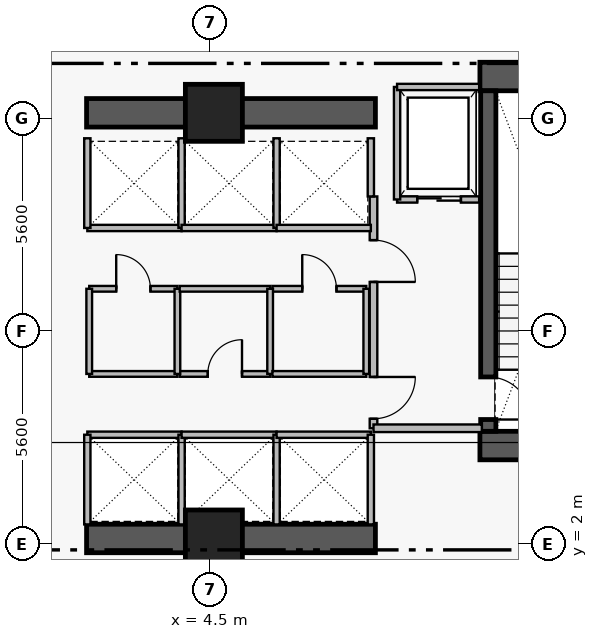
"""IFC4 building model, lengths in metres.
Left out: names, types, materials, properties, quantities, classifications, styles, units other than length and angle.
Written with IfcOpenShell. Run it as: python <this file> out.ifc"""

import sys

from ifc_helpers import new_model, si_unit, direction, frame, frame_2d, origin, origin_2d, place, context, subcontext, project, spatial, rectangle, extrude, element, fill, save


model = new_model("IFC4")
c1 = context("Model", 3, precision=1e-05, world=origin(), true_north=direction((0.0, 1.0)))
c2 = subcontext(c1, "Body", "Model", "MODEL_VIEW")
j1 = project(units=[si_unit("LENGTHUNIT", "METRE"), si_unit("PLANEANGLEUNIT", "RADIAN")], contexts=[c1])
p1 = place(None, origin())
s1 = spatial("IfcSite", under=j1, at=p1, CompositionType="ELEMENT")
p2 = place(p1, origin())
s2 = spatial("IfcBuilding", under=s1, at=p2, CompositionType="ELEMENT")
p3 = place(p2, frame((0.0, 0.0, 99.3)))
s3 = spatial("IfcBuildingStorey", under=s2, at=p3, CompositionType="ELEMENT", Elevation=99.3)
for number, where, z_axis, x_axis in (
    (1, (11.6, 14.305, 0.0), (0.0, 0.0, 1.0), (1.0, 0.0, 0.0)),
    (2, (11.6, 4.595, 0.0), (0.0, 0.0, 1.0), (1.0, 0.0, 0.0)),
):
    element("IfcWall", number, at=place(p3, frame(where, z_axis=z_axis, x_axis=x_axis)), inside=s3, PredefinedType="SHEAR", context=c2, shape_type="SweptSolid", body=[
        extrude(rectangle(XDim=4.56, YDim=0.75, at=frame_2d((2.28, 0.0))), origin(), (0.0, 0.0, 1.0), 3.46),
    ])
for number, where, z_axis, x_axis in (
    (3, (1.25, 2.15, 0.0), (0.0, 0.0, 1.0), (1.0, 0.0, 0.0)),
    (4, (1.25, 13.35, 0.0), (0.0, 0.0, 1.0), (1.0, 0.0, 0.0)),
):
    element("IfcWall", number, at=place(p3, frame(where, z_axis=z_axis, x_axis=x_axis)), inside=s3, PredefinedType="SHEAR", context=c2, shape_type="SweptSolid", body=[
        extrude(rectangle(XDim=7.6, YDim=0.75, at=frame_2d((3.8, 0.0))), origin(), (0.0, 0.0, 1.0), 3.43),
    ])
p4 = place(p3, frame((11.82, 13.93, 0.0), z_axis=(0.0, 0.0, 1.0), x_axis=(0.0, -1.0, 0.0)))
e5 = element("IfcWall", 5, at=p4, inside=s3, PredefinedType="SHEAR", context=c2, shape_type="SweptSolid", body=[
    extrude(rectangle(XDim=8.96, YDim=0.4, at=frame_2d((4.48, 0.0))), origin(), (0.0, 0.0, 1.0), 3.46),
])
p5 = place(p4, frame((7.53, 0.0, 0.0)))
e6 = element("IfcOpeningElement", 6, at=p5, cuts=e5, PredefinedType="OPENING", context=c2, shape_type="SweptSolid", body=[
    extrude(rectangle(XDim=1.12, YDim=2.22, at=frame_2d((0.56, 1.11))), frame((0.0, 0.21, 0.0), z_axis=(0.0, -1.0, 0.0), x_axis=(1.0, 0.0, 0.0)), (0.0, 0.0, 1.0), 0.42),
])
for number, where, z_axis, x_axis in (
    (7, (4.6, 13.35, 0.0), (0.0, 0.0, 1.0), (1.0, 0.0, 0.0)),
    (8, (4.6, 2.15, 0.0), (0.0, 0.0, 1.0), (1.0, 0.0, 0.0)),
):
    element("IfcColumn", number, at=place(p3, frame(where, z_axis=z_axis, x_axis=x_axis)), inside=s3, PredefinedType="COLUMN", context=c2, shape_type="SweptSolid", body=[
        extrude(rectangle(XDim=1.5, YDim=1.5, at=origin_2d()), origin(), (0.0, 0.0, 1.0), 3.65),
    ])
p6 = place(p3, frame((8.8, 11.15, 0.0), z_axis=(0.0, 0.0, 1.0), x_axis=(0.0, -1.0, 0.0)))
e9 = element("IfcWall", 9, at=p6, inside=s3, PredefinedType="PARTITIONING", context=c2, shape_type="SweptSolid", body=[
    extrude(rectangle(XDim=6.1, YDim=0.2, at=frame_2d((3.05, 0.0))), origin(), (0.0, 0.0, 1.0), 3.43),
])
p7 = place(p6, frame((1.15, 0.0, 0.0)))
e10 = element("IfcOpeningElement", 10, at=p7, cuts=e9, PredefinedType="OPENING", context=c2, shape_type="SweptSolid", body=[
    extrude(rectangle(XDim=1.1, YDim=2.2, at=frame_2d((0.55, 1.1))), frame((0.0, 0.11, 0.0), z_axis=(0.0, -1.0, 0.0), x_axis=(1.0, 0.0, 0.0)), (0.0, 0.0, 1.0), 0.22),
])
p8 = place(p6, frame((4.75, 0.0, 0.0)))
e11 = element("IfcOpeningElement", 11, at=p8, cuts=e9, PredefinedType="OPENING", context=c2, shape_type="SweptSolid", body=[
    extrude(rectangle(XDim=1.1, YDim=2.2, at=frame_2d((0.55, 1.1))), frame((0.0, 0.11, 0.0), z_axis=(0.0, -1.0, 0.0), x_axis=(1.0, 0.0, 0.0)), (0.0, 0.0, 1.0), 0.22),
])
p9 = place(p3, frame((9.42, 11.07, 0.0), z_axis=(0.0, 0.0, 1.0), x_axis=(1.0, 0.0, 0.0)))
e12 = element("IfcWall", 12, at=p9, inside=s3, PredefinedType="PARTITIONING", context=c2, shape_type="SweptSolid", body=[
    extrude(rectangle(XDim=2.16, YDim=0.165, at=frame_2d((1.08, 0.0))), origin(), (0.0, 0.0, 1.0), 3.43),
])
p10 = place(p9, frame((0.53, 0.0, 0.0)))
e13 = element("IfcOpeningElement", 13, at=p10, cuts=e12, PredefinedType="OPENING", context=c2, shape_type="SweptSolid", body=[
    extrude(rectangle(XDim=1.15, YDim=2.25, at=frame_2d((0.575, 1.125))), frame((0.0, 0.093, 0.0), z_axis=(0.0, -1.0, 0.0), x_axis=(1.0, 0.0, 0.0)), (0.0, 0.0, 1.0), 0.185),
])
p11 = place(p3, frame((1.32, 8.72, 0.0), z_axis=(0.0, 0.0, 1.0), x_axis=(1.0, 0.0, 0.0)))
e14 = element("IfcWall", 14, at=p11, inside=s3, PredefinedType="PARTITIONING", context=c2, shape_type="SweptSolid", body=[
    extrude(rectangle(XDim=2.32, YDim=0.15, at=frame_2d((1.16, 0.0))), origin(), (0.0, 0.0, 1.0), 3.43),
])
p12 = place(p11, frame((0.71, 0.0, 0.0)))
e15 = element("IfcOpeningElement", 15, at=p12, cuts=e14, PredefinedType="OPENING", context=c2, shape_type="SweptSolid", body=[
    extrude(rectangle(XDim=0.9, YDim=2.15, at=frame_2d((0.45, 1.075))), frame((0.0, 0.085, 0.0), z_axis=(0.0, -1.0, 0.0), x_axis=(1.0, 0.0, 0.0)), (0.0, 0.0, 1.0), 0.17),
])
p13 = place(p3, frame((3.7, 6.48, 0.0), z_axis=(0.0, 0.0, 1.0), x_axis=(1.0, 0.0, 0.0)))
e16 = element("IfcWall", 16, at=p13, inside=s3, PredefinedType="PARTITIONING", context=c2, shape_type="SweptSolid", body=[
    extrude(rectangle(XDim=2.38, YDim=0.15, at=frame_2d((1.19, 0.0))), origin(), (0.0, 0.0, 1.0), 3.43),
])
p14 = place(p13, frame((0.74, 0.0, 0.0)))
e17 = element("IfcOpeningElement", 17, at=p14, cuts=e16, PredefinedType="OPENING", context=c2, shape_type="SweptSolid", body=[
    extrude(rectangle(XDim=0.9, YDim=2.15, at=frame_2d((0.45, 1.075))), frame((0.0, 0.085, 0.0), z_axis=(0.0, -1.0, 0.0), x_axis=(1.0, 0.0, 0.0)), (0.0, 0.0, 1.0), 0.17),
])
p15 = place(p3, frame((6.14, 8.72, 0.0), z_axis=(0.0, 0.0, 1.0), x_axis=(1.0, 0.0, 0.0)))
e18 = element("IfcWall", 18, at=p15, inside=s3, PredefinedType="PARTITIONING", context=c2, shape_type="SweptSolid", body=[
    extrude(rectangle(XDim=2.47, YDim=0.15, at=frame_2d((1.235, 0.0))), origin(), (0.0, 0.0, 1.0), 3.43),
])
p16 = place(p15, frame((0.785, 0.0, 0.0)))
e19 = element("IfcOpeningElement", 19, at=p16, cuts=e18, PredefinedType="OPENING", context=c2, shape_type="SweptSolid", body=[
    extrude(rectangle(XDim=0.9, YDim=2.15, at=frame_2d((0.45, 1.075))), frame((0.0, 0.085, 0.0), z_axis=(0.0, -1.0, 0.0), x_axis=(1.0, 0.0, 0.0)), (0.0, 0.0, 1.0), 0.17),
])
p17 = place(p3, frame((8.8, 5.05, 0.0), z_axis=(0.0, 0.0, 1.0), x_axis=(1.0, 0.0, 0.0)))
e20 = element("IfcWall", 20, at=p17, inside=s3, PredefinedType="PARTITIONING", context=c2, shape_type="SweptSolid", body=[
    extrude(rectangle(XDim=2.85, YDim=0.2, at=frame_2d((1.425, 0.0))), origin(), (0.0, 0.0, 1.0), 3.43),
])
p18 = place(p3, frame((9.42, 11.07, 0.0), z_axis=(0.0, 0.0, 1.0), x_axis=(0.0, 1.0, 0.0)))
e21 = element("IfcWall", 21, at=p18, inside=s3, PredefinedType="PARTITIONING", context=c2, shape_type="SweptSolid", body=[
    extrude(rectangle(XDim=2.96, YDim=0.165, at=frame_2d((1.48, 0.0))), origin(), (0.0, 0.0, 1.0), 3.43),
])
p19 = place(p3, frame((9.42, 14.03, 0.0), z_axis=(0.0, 0.0, 1.0), x_axis=(1.0, 0.0, 0.0)))
e22 = element("IfcWall", 22, at=p19, inside=s3, PredefinedType="PARTITIONING", context=c2, shape_type="SweptSolid", body=[
    extrude(rectangle(XDim=2.16, YDim=0.165, at=frame_2d((1.08, 0.0))), origin(), (0.0, 0.0, 1.0), 3.43),
])
p20 = place(p3, frame((1.27, 4.88, 0.0), z_axis=(0.0, 0.0, 1.0), x_axis=(1.0, 0.0, 0.0)))
e23 = element("IfcWall", 23, at=p20, inside=s3, PredefinedType="PARTITIONING", context=c2, shape_type="SweptSolid", body=[
    extrude(rectangle(XDim=2.48, YDim=0.165, at=frame_2d((1.24, 0.0))), origin(), (0.0, 0.0, 1.0), 3.43),
])
for number, where, z_axis, x_axis in (
    (24, (1.27, 2.52, 0.0), (0.0, 0.0, 1.0), (0.0, 1.0, 0.0)),
    (25, (3.75, 2.52, 0.0), (0.0, 0.0, 1.0), (0.0, 1.0, 0.0)),
):
    element("IfcWall", number, at=place(p3, frame(where, z_axis=z_axis, x_axis=x_axis)), inside=s3, PredefinedType="PARTITIONING", context=c2, shape_type="SweptSolid", body=[
        extrude(rectangle(XDim=2.36, YDim=0.165, at=frame_2d((1.18, 0.0))), origin(), (0.0, 0.0, 1.0), 3.43),
    ])
p21 = place(p3, frame((1.27, 10.32, 0.0), z_axis=(0.0, 0.0, 1.0), x_axis=(1.0, 0.0, 0.0)))
e26 = element("IfcWall", 26, at=p21, inside=s3, PredefinedType="PARTITIONING", context=c2, shape_type="SweptSolid", body=[
    extrude(rectangle(XDim=2.48, YDim=0.165, at=frame_2d((1.24, 0.0))), origin(), (0.0, 0.0, 1.0), 3.43),
])
for number, where, z_axis, x_axis in (
    (27, (1.27, 10.32, 0.0), (0.0, 0.0, 1.0), (0.0, 1.0, 0.0)),
    (28, (3.75, 10.32, 0.0), (0.0, 0.0, 1.0), (0.0, 1.0, 0.0)),
):
    element("IfcWall", number, at=place(p3, frame(where, z_axis=z_axis, x_axis=x_axis)), inside=s3, PredefinedType="PARTITIONING", context=c2, shape_type="SweptSolid", body=[
        extrude(rectangle(XDim=2.36, YDim=0.165, at=frame_2d((1.18, 0.0))), origin(), (0.0, 0.0, 1.0), 3.43),
    ])
p22 = place(p3, frame((3.75, 4.88, 0.0), z_axis=(0.0, 0.0, 1.0), x_axis=(1.0, 0.0, 0.0)))
e29 = element("IfcWall", 29, at=p22, inside=s3, PredefinedType="PARTITIONING", context=c2, shape_type="SweptSolid", body=[
    extrude(rectangle(XDim=2.5, YDim=0.165, at=frame_2d((1.25, 0.0))), origin(), (0.0, 0.0, 1.0), 3.43),
])
p23 = place(p3, frame((6.25, 2.52, 0.0), z_axis=(0.0, 0.0, 1.0), x_axis=(0.0, 1.0, 0.0)))
e30 = element("IfcWall", 30, at=p23, inside=s3, PredefinedType="PARTITIONING", context=c2, shape_type="SweptSolid", body=[
    extrude(rectangle(XDim=2.36, YDim=0.165, at=frame_2d((1.18, 0.0))), origin(), (0.0, 0.0, 1.0), 3.43),
])
p24 = place(p3, frame((6.25, 4.88, 0.0), z_axis=(0.0, 0.0, 1.0), x_axis=(1.0, 0.0, 0.0)))
e31 = element("IfcWall", 31, at=p24, inside=s3, PredefinedType="PARTITIONING", context=c2, shape_type="SweptSolid", body=[
    extrude(rectangle(XDim=2.48, YDim=0.165, at=frame_2d((1.24, 0.0))), origin(), (0.0, 0.0, 1.0), 3.43),
])
p25 = place(p3, frame((8.73, 2.52, 0.0), z_axis=(0.0, 0.0, 1.0), x_axis=(0.0, 1.0, 0.0)))
e32 = element("IfcWall", 32, at=p25, inside=s3, PredefinedType="PARTITIONING", context=c2, shape_type="SweptSolid", body=[
    extrude(rectangle(XDim=2.36, YDim=0.165, at=frame_2d((1.18, 0.0))), origin(), (0.0, 0.0, 1.0), 3.43),
])
p26 = place(p3, frame((3.75, 10.32, 0.0), z_axis=(0.0, 0.0, 1.0), x_axis=(1.0, 0.0, 0.0)))
e33 = element("IfcWall", 33, at=p26, inside=s3, PredefinedType="PARTITIONING", context=c2, shape_type="SweptSolid", body=[
    extrude(rectangle(XDim=2.5, YDim=0.165, at=frame_2d((1.25, 0.0))), origin(), (0.0, 0.0, 1.0), 3.43),
])
p27 = place(p3, frame((6.25, 10.32, 0.0), z_axis=(0.0, 0.0, 1.0), x_axis=(0.0, 1.0, 0.0)))
e34 = element("IfcWall", 34, at=p27, inside=s3, PredefinedType="PARTITIONING", context=c2, shape_type="SweptSolid", body=[
    extrude(rectangle(XDim=2.36, YDim=0.165, at=frame_2d((1.18, 0.0))), origin(), (0.0, 0.0, 1.0), 3.43),
])
p28 = place(p3, frame((6.25, 10.32, 0.0), z_axis=(0.0, 0.0, 1.0), x_axis=(1.0, 0.0, 0.0)))
e35 = element("IfcWall", 35, at=p28, inside=s3, PredefinedType="PARTITIONING", context=c2, shape_type="SweptSolid", body=[
    extrude(rectangle(XDim=2.48, YDim=0.165, at=frame_2d((1.24, 0.0))), origin(), (0.0, 0.0, 1.0), 3.43),
])
p29 = place(p3, frame((8.73, 11.15, 0.0), z_axis=(0.0, 0.0, 1.0), x_axis=(0.0, 1.0, 0.0)))
e36 = element("IfcWall", 36, at=p29, inside=s3, PredefinedType="PARTITIONING", context=c2, shape_type="SweptSolid", body=[
    extrude(rectangle(XDim=1.53, YDim=0.165, at=frame_2d((0.765, 0.0))), origin(), (0.0, 0.0, 1.0), 3.43),
])
p30 = place(p3, frame((1.32, 6.48, 0.0), z_axis=(0.0, 0.0, 1.0), x_axis=(1.0, 0.0, 0.0)))
e37 = element("IfcWall", 37, at=p30, inside=s3, PredefinedType="PARTITIONING", context=c2, shape_type="SweptSolid", body=[
    extrude(rectangle(XDim=2.32, YDim=0.15, at=frame_2d((1.16, 0.0))), origin(), (0.0, 0.0, 1.0), 3.43),
])
for number, where, z_axis, x_axis in (
    (38, (1.32, 6.48, 0.0), (0.0, 0.0, 1.0), (0.0, 1.0, 0.0)),
    (39, (3.64, 6.48, 0.0), (0.0, 0.0, 1.0), (0.0, 1.0, 0.0)),
):
    element("IfcWall", number, at=place(p3, frame(where, z_axis=z_axis, x_axis=x_axis)), inside=s3, PredefinedType="PARTITIONING", context=c2, shape_type="SweptSolid", body=[
        extrude(rectangle(XDim=2.24, YDim=0.15, at=frame_2d((1.12, 0.0))), origin(), (0.0, 0.0, 1.0), 3.43),
    ])
p31 = place(p3, frame((3.7, 8.72, 0.0), z_axis=(0.0, 0.0, 1.0), x_axis=(1.0, 0.0, 0.0)))
e40 = element("IfcWall", 40, at=p31, inside=s3, PredefinedType="PARTITIONING", context=c2, shape_type="SweptSolid", body=[
    extrude(rectangle(XDim=2.38, YDim=0.15, at=frame_2d((1.19, 0.0))), origin(), (0.0, 0.0, 1.0), 3.43),
])
p32 = place(p3, frame((6.08, 6.48, 0.0), z_axis=(0.0, 0.0, 1.0), x_axis=(0.0, 1.0, 0.0)))
e41 = element("IfcWall", 41, at=p32, inside=s3, PredefinedType="PARTITIONING", context=c2, shape_type="SweptSolid", body=[
    extrude(rectangle(XDim=2.24, YDim=0.15, at=frame_2d((1.12, 0.0))), origin(), (0.0, 0.0, 1.0), 3.43),
])
p33 = place(p3, frame((6.14, 6.48, 0.0), z_axis=(0.0, 0.0, 1.0), x_axis=(1.0, 0.0, 0.0)))
e42 = element("IfcWall", 42, at=p33, inside=s3, PredefinedType="PARTITIONING", context=c2, shape_type="SweptSolid", body=[
    extrude(rectangle(XDim=2.47, YDim=0.15, at=frame_2d((1.235, 0.0))), origin(), (0.0, 0.0, 1.0), 3.43),
])
p34 = place(p3, frame((8.61, 6.48, 0.0), z_axis=(0.0, 0.0, 1.0), x_axis=(0.0, 1.0, 0.0)))
e43 = element("IfcWall", 43, at=p34, inside=s3, PredefinedType="PARTITIONING", context=c2, shape_type="SweptSolid", body=[
    extrude(rectangle(XDim=2.24, YDim=0.15, at=frame_2d((1.12, 0.0))), origin(), (0.0, 0.0, 1.0), 3.43),
])
p35 = place(p5, origin())
e44 = element("IfcDoor", 44, at=p35, inside=s3, OperationType="SINGLE_SWING_RIGHT", PredefinedType="DOOR", context=c2, shape_type="SweptSolid", body=[
    extrude(rectangle(XDim=1.12, YDim=2.22, at=frame_2d((0.56, 1.11))), frame((0.0, 0.025, 0.0), z_axis=(0.0, -1.0, 0.0), x_axis=(1.0, 0.0, 0.0)), (0.0, 0.0, 1.0), 0.05),
])
fill(e6, e44)
p36 = place(p7, origin())
e45 = element("IfcDoor", 45, at=p36, inside=s3, OperationType="SINGLE_SWING_RIGHT", PredefinedType="DOOR", context=c2, shape_type="SweptSolid", body=[
    extrude(rectangle(XDim=1.1, YDim=2.2, at=frame_2d((0.55, 1.1))), frame((0.0, 0.025, 0.0), z_axis=(0.0, -1.0, 0.0), x_axis=(1.0, 0.0, 0.0)), (0.0, 0.0, 1.0), 0.05),
])
fill(e10, e45)
p37 = place(p8, origin())
e46 = element("IfcDoor", 46, at=p37, inside=s3, OperationType="SINGLE_SWING_LEFT", PredefinedType="DOOR", context=c2, shape_type="SweptSolid", body=[
    extrude(rectangle(XDim=1.1, YDim=2.2, at=frame_2d((0.55, 1.1))), frame((0.0, 0.025, 0.0), z_axis=(0.0, -1.0, 0.0), x_axis=(1.0, 0.0, 0.0)), (0.0, 0.0, 1.0), 0.05),
])
fill(e11, e46)
p38 = place(p10, origin())
e47 = element("IfcDoor", 47, at=p38, inside=s3, OperationType="SLIDING_TO_LEFT", PredefinedType="DOOR", context=c2, shape_type="SweptSolid", body=[
    extrude(rectangle(XDim=1.15, YDim=2.25, at=frame_2d((0.575, 1.125))), frame((0.0, 0.025, 0.0), z_axis=(0.0, -1.0, 0.0), x_axis=(1.0, 0.0, 0.0)), (0.0, 0.0, 1.0), 0.05),
])
fill(e13, e47)
p39 = place(p12, origin())
e48 = element("IfcDoor", 48, at=p39, inside=s3, OperationType="SINGLE_SWING_LEFT", PredefinedType="DOOR", context=c2, shape_type="SweptSolid", body=[
    extrude(rectangle(XDim=0.9, YDim=2.15, at=frame_2d((0.45, 1.075))), frame((0.0, 0.025, 0.0), z_axis=(0.0, -1.0, 0.0), x_axis=(1.0, 0.0, 0.0)), (0.0, 0.0, 1.0), 0.05),
])
fill(e15, e48)
p40 = place(p14, origin())
e49 = element("IfcDoor", 49, at=p40, inside=s3, OperationType="SINGLE_SWING_RIGHT", PredefinedType="DOOR", context=c2, shape_type="SweptSolid", body=[
    extrude(rectangle(XDim=0.9, YDim=2.15, at=frame_2d((0.45, 1.075))), frame((0.0, 0.025, 0.0), z_axis=(0.0, -1.0, 0.0), x_axis=(1.0, 0.0, 0.0)), (0.0, 0.0, 1.0), 0.05),
])
fill(e17, e49)
p41 = place(p16, origin())
e50 = element("IfcDoor", 50, at=p41, inside=s3, OperationType="SINGLE_SWING_LEFT", PredefinedType="DOOR", context=c2, shape_type="SweptSolid", body=[
    extrude(rectangle(XDim=0.9, YDim=2.15, at=frame_2d((0.45, 1.075))), frame((0.0, 0.025, 0.0), z_axis=(0.0, -1.0, 0.0), x_axis=(1.0, 0.0, 0.0)), (0.0, 0.0, 1.0), 0.05),
])
fill(e19, e50)
save(model, sys.argv[1])
